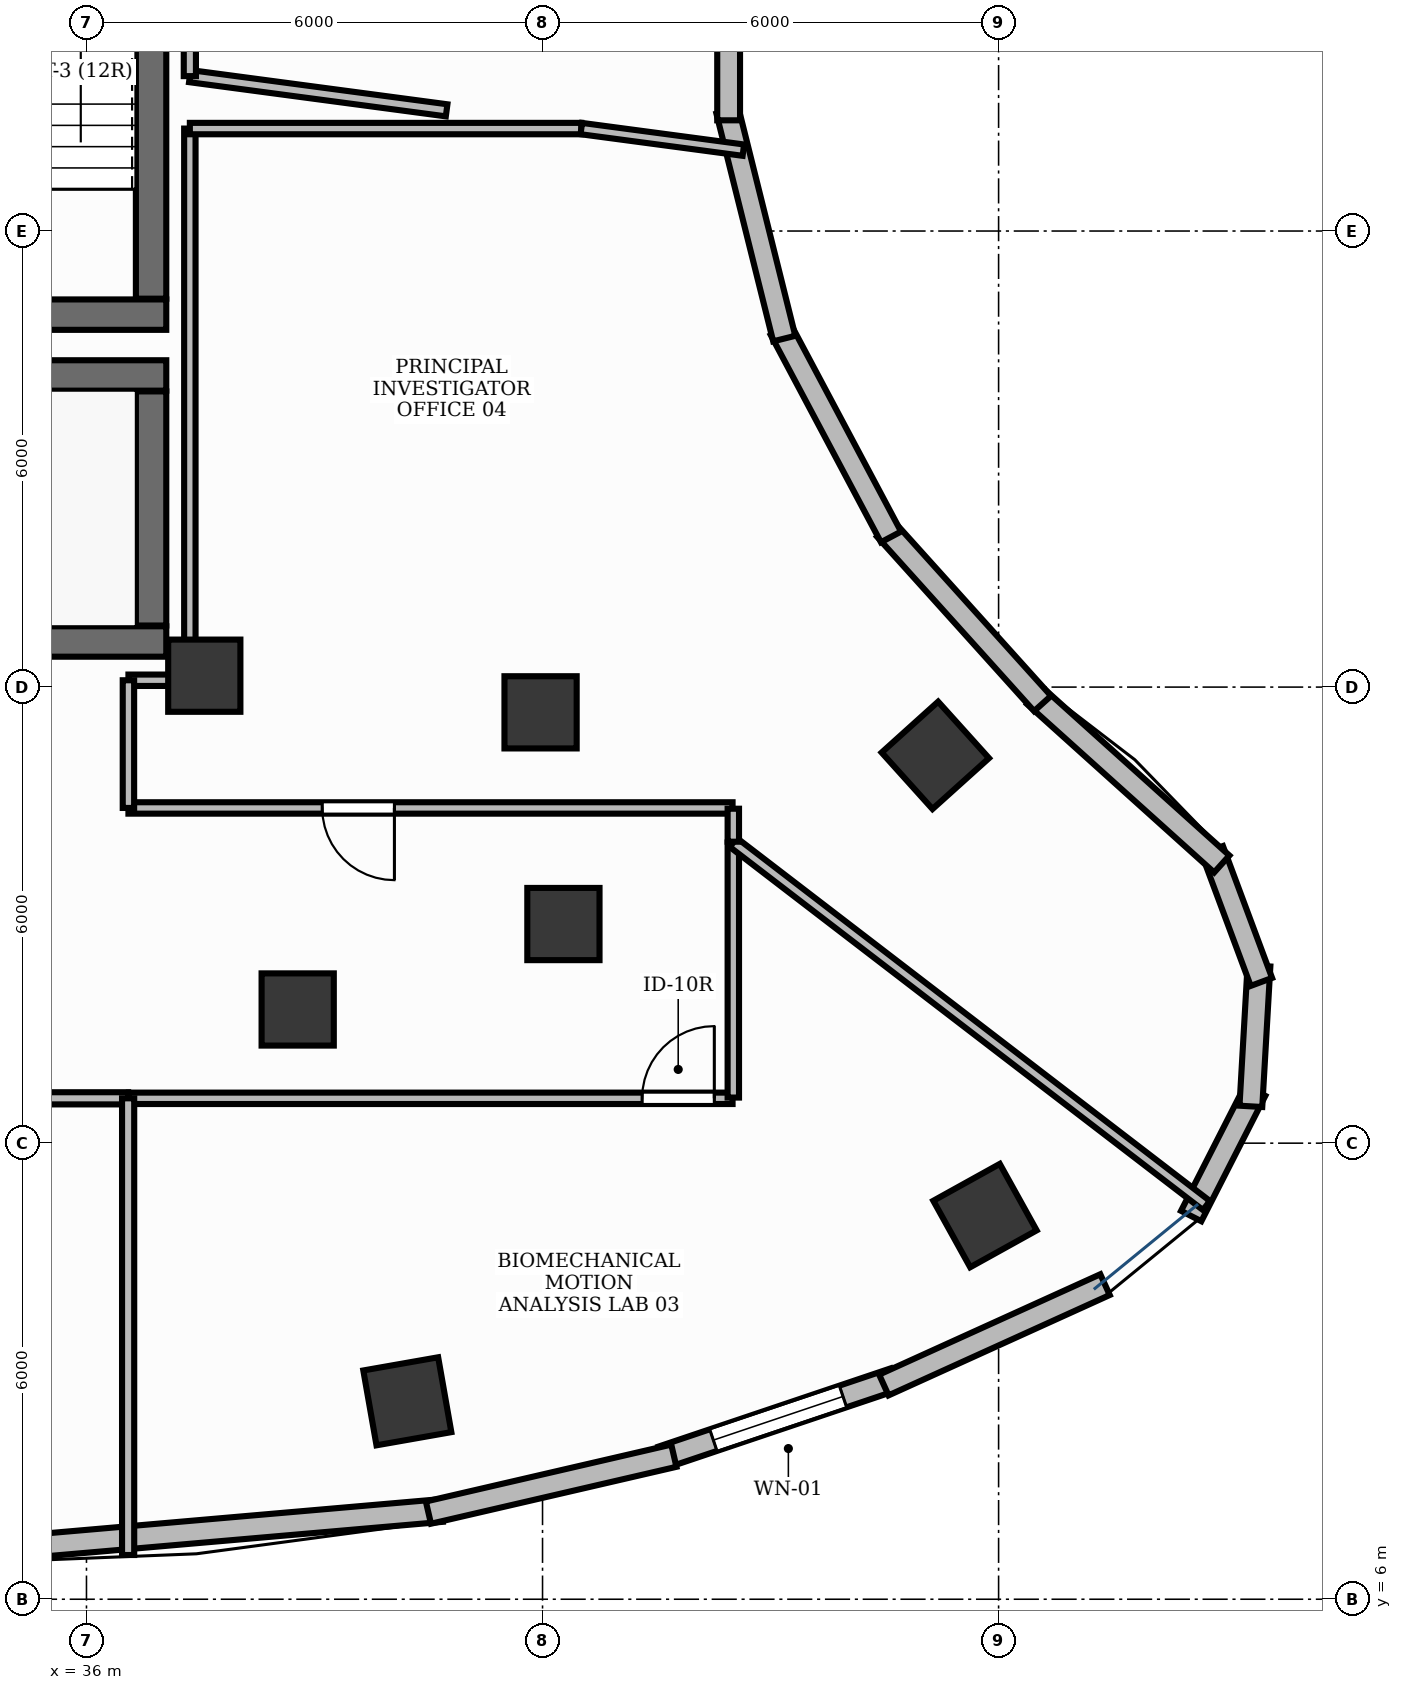
"""IFC4 building model, lengths in metres.
Left out: names, types, materials, properties, quantities, classifications, styles, units other than length and angle.
Written with IfcOpenShell. Run it as: python <this file> out.ifc"""

import sys

from ifc_helpers import new_model, si_unit, direction, frame, frame_2d, origin, origin_2d, place, context, subcontext, project, spatial, rectangle, extrude, element, fill, save


model = new_model("IFC4")
c1 = context("Model", 3, precision=1e-05, world=origin(), true_north=direction((0.0, 1.0)))
c2 = subcontext(c1, "Body", "Model", "MODEL_VIEW")
j1 = project(units=[si_unit("LENGTHUNIT", "METRE"), si_unit("PLANEANGLEUNIT", "RADIAN")], contexts=[c1])
p1 = place(None, origin())
s1 = spatial("IfcSite", under=j1, at=p1, CompositionType="ELEMENT")
p2 = place(p1, origin())
s2 = spatial("IfcBuilding", under=s1, at=p2, CompositionType="ELEMENT")
p3 = place(p2, frame((0.0, 0.0, 179.4)))
s3 = spatial("IfcBuildingStorey", under=s2, at=p3, CompositionType="ELEMENT", Elevation=179.4)
p4 = place(p3, frame((28.852, 18.6, 0.0), z_axis=(0.0, 0.0, 1.0), x_axis=(1.0, 0.0, 0.0)))
e1 = element("IfcWall", 1, at=p4, inside=s3, PredefinedType="SHEAR", context=c2, shape_type="SweptSolid", body=[
    extrude(rectangle(XDim=8.198, YDim=0.4, at=frame_2d((4.099, 0.0))), origin(), (0.0, 0.0, 1.0), 3.9),
])
p5 = place(p3, frame((28.4, 22.1, 0.0), z_axis=(0.0, 0.0, 1.0), x_axis=(1.0, 0.0, 0.0)))
e2 = element("IfcWall", 2, at=p5, inside=s3, PredefinedType="SHEAR", context=c2, shape_type="SweptSolid", body=[
    extrude(rectangle(XDim=8.65, YDim=0.4, at=frame_2d((4.325, 0.0))), origin(), (0.0, 0.0, 1.0), 3.9),
])
p6 = place(p3, frame((36.85, 18.81, 0.0), z_axis=(0.0, 0.0, 1.0), x_axis=(0.0, 1.0, 0.0)))
e3 = element("IfcWall", 3, at=p6, inside=s3, PredefinedType="SHEAR", context=c2, shape_type="SweptSolid", body=[
    extrude(rectangle(XDim=3.08, YDim=0.4, at=frame_2d((1.54, 0.0))), origin(), (0.0, 0.0, 1.0), 3.9),
])
p7 = place(p3, frame((33.15, 22.9, 0.0), z_axis=(0.0, 0.0, 1.0), x_axis=(1.0, 0.0, 0.0)))
e4 = element("IfcWall", 4, at=p7, inside=s3, PredefinedType="SHEAR", context=c2, shape_type="SweptSolid", body=[
    extrude(rectangle(XDim=3.9, YDim=0.4, at=frame_2d((1.95, 0.0))), origin(), (0.0, 0.0, 1.0), 3.9),
])
p8 = place(p3, frame((36.85, 23.11, 0.0), z_axis=(0.0, 0.0, 1.0), x_axis=(0.0, 1.0, 0.0)))
e5 = element("IfcWall", 5, at=p8, inside=s3, PredefinedType="SHEAR", context=c2, shape_type="SweptSolid", body=[
    extrude(rectangle(XDim=7.78, YDim=0.4, at=frame_2d((3.89, 0.0))), origin(), (0.0, 0.0, 1.0), 3.9),
])
p9 = place(p3, frame((37.55, 18.15, -0.0), z_axis=(0.0, 0.0, 1.0), x_axis=(1.0, 0.0, 0.0)))
e6 = element("IfcColumn", 6, at=p9, inside=s3, PredefinedType="PILASTER", context=c2, shape_type="SweptSolid", body=[
    extrude(rectangle(XDim=0.95, YDim=0.95, at=origin_2d()), origin(), (0.0, 0.0, 1.0), 3.901),
])
p10 = place(p3, frame((40.221, 8.604, -0.0), z_axis=(0.0, 0.0, 1.0), x_axis=(0.984868307662, 0.173304404339, 0.0)))
e7 = element("IfcColumn", 7, at=p10, inside=s3, PredefinedType="COLUMN", context=c2, shape_type="SweptSolid", body=[
    extrude(rectangle(XDim=1.0, YDim=1.0, at=origin_2d()), origin(), (0.0, 0.0, 1.0), 3.901),
])
p11 = place(p3, frame((38.779, 13.759, -0.0), z_axis=(0.0, 0.0, 1.0), x_axis=(1.0, 0.0, 0.0)))
e8 = element("IfcColumn", 8, at=p11, inside=s3, PredefinedType="COLUMN", context=c2, shape_type="SweptSolid", body=[
    extrude(rectangle(XDim=0.95, YDim=0.95, at=origin_2d()), origin(), (0.0, 0.0, 1.0), 3.901),
])
p12 = place(p3, frame((47.821, 11.047, -0.0), z_axis=(0.0, 0.0, 1.0), x_axis=(0.874535078577, 0.484962262797, 0.0)))
e9 = element("IfcColumn", 9, at=p12, inside=s3, PredefinedType="COLUMN", context=c2, shape_type="SweptSolid", body=[
    extrude(rectangle(XDim=1.0, YDim=1.0, at=origin_2d()), origin(), (0.0, 0.0, 1.0), 3.901),
])
p13 = place(p3, frame((42.275, 14.883, -0.0), z_axis=(0.0, 0.0, 1.0), x_axis=(1.0, 0.0, 0.0)))
e10 = element("IfcColumn", 10, at=p13, inside=s3, PredefinedType="COLUMN", context=c2, shape_type="SweptSolid", body=[
    extrude(rectangle(XDim=0.95, YDim=0.95, at=origin_2d()), origin(), (0.0, 0.0, 1.0), 3.901),
])
p14 = place(p3, frame((47.167, 17.102, -0.0), z_axis=(0.0, 0.0, 1.0), x_axis=(-0.669130606359, 0.743144825477, 0.0)))
e11 = element("IfcColumn", 11, at=p14, inside=s3, PredefinedType="COLUMN", context=c2, shape_type="SweptSolid", body=[
    extrude(rectangle(XDim=1.0, YDim=1.0, at=origin_2d()), origin(), (0.0, 0.0, 1.0), 3.901),
])
p15 = place(p3, frame((41.974, 17.668, -0.0), z_axis=(0.0, 0.0, 1.0), x_axis=(1.0, 0.0, 0.0)))
e12 = element("IfcColumn", 12, at=p15, inside=s3, PredefinedType="COLUMN", context=c2, shape_type="SweptSolid", body=[
    extrude(rectangle(XDim=0.95, YDim=0.95, at=origin_2d()), origin(), (0.0, 0.0, 1.0), 3.901),
])
p16 = place(p3, frame((43.573, 7.866, 0.0), z_axis=(0.0, 0.0, 1.0), x_axis=(0.947663163736, 0.319271871761, 0.0)))
e13 = element("IfcWall", 13, at=p16, inside=s3, PredefinedType="STANDARD", context=c2, shape_type="SweptSolid", body=[
    extrude(rectangle(XDim=3.222, YDim=0.3, at=frame_2d((1.611, 0.0))), origin(), (0.0, 0.0, 1.0), 3.9),
])
p17 = place(p16, frame((0.711, 0.0, 0.9)))
e14 = element("IfcOpeningElement", 14, at=p17, cuts=e13, PredefinedType="OPENING", context=c2, shape_type="SweptSolid", body=[
    extrude(rectangle(XDim=1.8, YDim=2.1, at=frame_2d((0.9, 1.05))), frame((0.0, 0.165, 0.0), z_axis=(0.0, -1.0, 0.0), x_axis=(1.0, 0.0, 0.0)), (0.0, 0.0, 1.0), 0.33),
])
p18 = place(p3, frame((34.149, 6.601, 0.0), z_axis=(0.0, 0.0, 1.0), x_axis=(0.996255675021, 0.086455942472, 0.0)))
e15 = element("IfcWall", 15, at=p18, inside=s3, PredefinedType="STANDARD", context=c2, shape_type="SweptSolid", body=[
    extrude(rectangle(XDim=6.551, YDim=0.3, at=frame_2d((3.276, 0.0))), origin(), (0.0, 0.0, 1.0), 3.9),
])
p19 = place(p3, frame((40.499, 7.14, 0.0), z_axis=(0.0, 0.0, 1.0), x_axis=(0.974179712493, 0.225773974956, 0.0)))
e16 = element("IfcWall", 16, at=p19, inside=s3, PredefinedType="STANDARD", context=c2, shape_type="SweptSolid", body=[
    extrude(rectangle(XDim=3.314, YDim=0.3, at=frame_2d((1.657, 0.0))), origin(), (0.0, 0.0, 1.0), 3.9),
])
p20 = place(p3, frame((46.49, 8.818, 0.0), z_axis=(0.0, 0.0, 1.0), x_axis=(0.910633193525, 0.413215666268, 0.0)))
e17 = element("IfcWall", 17, at=p20, inside=s3, PredefinedType="STANDARD", context=c2, shape_type="SweptSolid", body=[
    extrude(rectangle(XDim=3.195, YDim=0.3, at=frame_2d((1.598, 0.0))), origin(), (0.0, 0.0, 1.0), 3.9),
])
for number, where, z_axis, x_axis in (
    (18, (50.534, 11.041, 0.0), (0.0, 0.0, 1.0), (0.454, 0.891, 0.0)),
    (19, (51.319, 12.484, 0.0), (0.0, 0.0, 1.0), (0.057, 0.998, 0.0)),
    (20, (51.458, 14.121, 0.0), (0.0, 0.0, 1.0), (-0.349, 0.937, 0.0)),
):
    element("IfcWall", number, at=place(p3, frame(where, z_axis=z_axis, x_axis=x_axis)), inside=s3, PredefinedType="STANDARD", context=c2, shape_type="SweptSolid", body=[
        extrude(rectangle(XDim=1.852, YDim=0.3, at=frame_2d((0.926, 0.0))), origin(), (0.0, 0.0, 1.0), 3.9),
    ])
p21 = place(p3, frame((50.936, 15.673, 0.0), z_axis=(0.0, 0.0, 1.0), x_axis=(-0.743341827472, 0.668911748687, 0.0)))
e21 = element("IfcWall", 21, at=p21, inside=s3, PredefinedType="STANDARD", context=c2, shape_type="SweptSolid", body=[
    extrude(rectangle(XDim=3.31, YDim=0.3, at=frame_2d((1.655, 0.0))), origin(), (0.0, 0.0, 1.0), 3.9),
])
for number, where, z_axis, x_axis in (
    (22, (48.579, 17.784, 0.0), (0.0, 0.0, 1.0), (-0.669, 0.743, 0.0)),
    (23, (46.584, 19.976, 0.0), (0.0, 0.0, 1.0), (-0.469, 0.883, 0.0)),
    (24, (45.18, 22.585, 0.0), (0.0, 0.0, 1.0), (-0.242, 0.97, 0.0)),
    (25, (44.448, 25.457, 0.0), (0.0, 0.0, 1.0), (0.0, 1.0, 0.0)),
):
    element("IfcWall", number, at=place(p3, frame(where, z_axis=z_axis, x_axis=x_axis)), inside=s3, PredefinedType="STANDARD", context=c2, shape_type="SweptSolid", body=[
        extrude(rectangle(XDim=3.087, YDim=0.3, at=frame_2d((1.543, 0.0))), origin(), (0.0, 0.0, 1.0), 3.9),
    ])
p22 = place(p3, frame((19.85, 12.59, 0.0), z_axis=(0.0, 0.0, 1.0), x_axis=(1.0, 0.0, 0.0)))
e26 = element("IfcWall", 26, at=p22, inside=s3, PredefinedType="PARTITIONING", context=c2, shape_type="SweptSolid", body=[
    extrude(rectangle(XDim=16.698, YDim=0.16, at=frame_2d((8.349, 0.0))), origin(), (0.0, 0.0, 1.0), 2.91),
])
p23 = place(p22, frame((4.999, 0.0, 0.0)))
e27 = element("IfcOpeningElement", 27, at=p23, cuts=e26, PredefinedType="OPENING", context=c2, shape_type="SweptSolid", body=[
    extrude(rectangle(XDim=0.95, YDim=2.15, at=frame_2d((0.475, 1.075))), frame((0.0, 0.095, 0.0), z_axis=(0.0, -1.0, 0.0), x_axis=(1.0, 0.0, 0.0)), (0.0, 0.0, 1.0), 0.19),
])
p24 = place(p3, frame((36.558, 12.59, 0.0), z_axis=(0.0, 0.0, 1.0), x_axis=(1.0, 0.0, 0.0)))
e28 = element("IfcWall", 28, at=p24, inside=s3, PredefinedType="PARTITIONING", context=c2, shape_type="SweptSolid", body=[
    extrude(rectangle(XDim=7.942, YDim=0.15, at=frame_2d((3.971, 0.0))), origin(), (0.0, 0.0, 1.0), 2.91),
])
p25 = place(p24, frame((6.752, 0.0, 0.0)))
e29 = element("IfcOpeningElement", 29, at=p25, cuts=e28, PredefinedType="OPENING", context=c2, shape_type="SweptSolid", body=[
    extrude(rectangle(XDim=0.95, YDim=2.15, at=frame_2d((0.475, 1.075))), frame((0.0, 0.09, 0.0), z_axis=(0.0, -1.0, 0.0), x_axis=(1.0, 0.0, 0.0)), (0.0, 0.0, 1.0), 0.18),
])
p26 = place(p3, frame((44.5, 16.41, 0.0), z_axis=(0.0, 0.0, 1.0), x_axis=(-1.0, 0.0, 0.0)))
e30 = element("IfcWall", 30, at=p26, inside=s3, PredefinedType="PARTITIONING", context=c2, shape_type="SweptSolid", body=[
    extrude(rectangle(XDim=7.948, YDim=0.15, at=frame_2d((3.974, 0.0))), origin(), (0.0, 0.0, 1.0), 2.91),
])
p27 = place(p26, frame((4.449, 0.0, 0.0)))
e31 = element("IfcOpeningElement", 31, at=p27, cuts=e30, PredefinedType="OPENING", context=c2, shape_type="SweptSolid", body=[
    extrude(rectangle(XDim=0.95, YDim=2.15, at=frame_2d((0.475, 1.075))), frame((0.0, 0.09, 0.0), z_axis=(0.0, -1.0, 0.0), x_axis=(1.0, 0.0, 0.0)), (0.0, 0.0, 1.0), 0.18),
])
p28 = place(p3, frame((36.548, 12.59, 0.0), z_axis=(0.0, 0.0, 1.0), x_axis=(0.0, -1.0, 0.0)))
e32 = element("IfcWall", 32, at=p28, inside=s3, PredefinedType="PARTITIONING", context=c2, shape_type="SweptSolid", body=[
    extrude(rectangle(XDim=6.008, YDim=0.16, at=frame_2d((3.004, 0.0))), origin(), (0.0, 0.0, 1.0), 2.91),
])
p29 = place(p3, frame((44.51, 12.6, 0.0), z_axis=(0.0, 0.0, 1.0), x_axis=(0.0, 1.0, 0.0)))
e33 = element("IfcWall", 33, at=p29, inside=s3, PredefinedType="PARTITIONING", context=c2, shape_type="SweptSolid", body=[
    extrude(rectangle(XDim=3.356, YDim=0.15, at=frame_2d((1.678, 0.0))), origin(), (0.0, 0.0, 1.0), 2.91),
])
p30 = place(p3, frame((44.51, 15.956, 0.0), z_axis=(0.0, 0.0, 1.0), x_axis=(0.793353363714, -0.608761398484, 0.0)))
e34 = element("IfcWall", 34, at=p30, inside=s3, PredefinedType="PARTITIONING", context=c2, shape_type="SweptSolid", body=[
    extrude(rectangle(XDim=7.846, YDim=0.15, at=frame_2d((3.923, 0.0))), origin(), (0.0, 0.0, 1.0), 2.91),
])
p31 = place(p3, frame((36.552, 18.09, 0.0), z_axis=(0.0, 0.0, 1.0), x_axis=(1.0, 0.0, 0.0)))
e35 = element("IfcWall", 35, at=p31, inside=s3, PredefinedType="PARTITIONING", context=c2, shape_type="SweptSolid", body=[
    extrude(rectangle(XDim=0.798, YDim=0.15, at=frame_2d((0.399, 0.0))), origin(), (0.0, 0.0, 1.0), 2.91),
])
p32 = place(p3, frame((37.36, 18.1, 0.0), z_axis=(0.0, 0.0, 1.0), x_axis=(0.0, 1.0, 0.0)))
e36 = element("IfcWall", 36, at=p32, inside=s3, PredefinedType="PARTITIONING", context=c2, shape_type="SweptSolid", body=[
    extrude(rectangle(XDim=7.248, YDim=0.15, at=frame_2d((3.624, 0.0))), origin(), (0.0, 0.0, 1.0), 2.91),
])
p33 = place(p3, frame((37.36, 25.348, 0.0), z_axis=(0.0, 0.0, 1.0), x_axis=(1.0, 0.0, 0.0)))
e37 = element("IfcWall", 37, at=p33, inside=s3, PredefinedType="PARTITIONING", context=c2, shape_type="SweptSolid", body=[
    extrude(rectangle(XDim=5.15, YDim=0.15, at=frame_2d((2.575, 0.0))), origin(), (0.0, 0.0, 1.0), 2.91),
])
p34 = place(p3, frame((42.51, 25.348, 0.0), z_axis=(0.0, 0.0, 1.0), x_axis=(0.991248706097, -0.132007585617, 0.0)))
e38 = element("IfcWall", 38, at=p34, inside=s3, PredefinedType="PARTITIONING", context=c2, shape_type="SweptSolid", body=[
    extrude(rectangle(XDim=2.151, YDim=0.15, at=frame_2d((1.075, 0.0))), origin(), (0.0, 0.0, 1.0), 2.91),
])
p35 = place(p3, frame((44.51, 15.966, 0.0), z_axis=(0.0, 0.0, 1.0), x_axis=(0.0, 1.0, 0.0)))
e39 = element("IfcWall", 39, at=p35, inside=s3, PredefinedType="PARTITIONING", context=c2, shape_type="SweptSolid", body=[
    extrude(rectangle(XDim=0.434, YDim=0.15, at=frame_2d((0.217, 0.0))), origin(), (0.0, 0.0, 1.0), 2.91),
])
p36 = place(p3, frame((36.552, 16.41, 0.0), z_axis=(0.0, 0.0, 1.0), x_axis=(0.0, 1.0, 0.0)))
e40 = element("IfcWall", 40, at=p36, inside=s3, PredefinedType="PARTITIONING", context=c2, shape_type="SweptSolid", body=[
    extrude(rectangle(XDim=1.68, YDim=0.15, at=frame_2d((0.84, 0.0))), origin(), (0.0, 0.0, 1.0), 2.91),
])
p37 = place(p3, frame((40.738, 25.588, 0.0), z_axis=(0.0, 0.0, 1.0), x_axis=(-0.9912460353, 0.13202763916, 0.0)))
e41 = element("IfcWall", 41, at=p37, inside=s3, PredefinedType="PARTITIONING", context=c2, shape_type="SweptSolid", body=[
    extrude(rectangle(XDim=3.408, YDim=0.16, at=frame_2d((1.704, 0.0))), origin(), (0.0, 0.0, 1.0), 2.91),
])
p38 = place(p3, frame((37.36, 26.038, 0.0), z_axis=(0.0, 0.0, 1.0), x_axis=(0.0, 1.0, 0.0)))
e42 = element("IfcWall", 42, at=p38, inside=s3, PredefinedType="PARTITIONING", context=c2, shape_type="SweptSolid", body=[
    extrude(rectangle(XDim=7.912, YDim=0.16, at=frame_2d((3.956, 0.0))), origin(), (0.0, 0.0, 1.0), 2.91),
])
p39 = place(p17, origin())
e43 = element("IfcWindow", 43, at=p39, inside=s3, PartitioningType="SINGLE_PANEL", PredefinedType="WINDOW", context=c2, shape_type="SweptSolid", body=[
    extrude(rectangle(XDim=1.8, YDim=2.1, at=frame_2d((0.9, 1.05))), frame((0.0, 0.03, 0.0), z_axis=(0.0, -1.0, 0.0), x_axis=(1.0, 0.0, 0.0)), (0.0, 0.0, 1.0), 0.06),
])
fill(e14, e43)
p40 = place(p25, origin())
e44 = element("IfcDoor", 44, at=p40, inside=s3, OperationType="SINGLE_SWING_RIGHT", PredefinedType="DOOR", context=c2, shape_type="SweptSolid", body=[
    extrude(rectangle(XDim=0.95, YDim=2.15, at=frame_2d((0.475, 1.075))), frame((0.0, 0.025, 0.0), z_axis=(0.0, -1.0, 0.0), x_axis=(1.0, 0.0, 0.0)), (0.0, 0.0, 1.0), 0.05),
])
fill(e29, e44)
p41 = place(p27, origin())
e45 = element("IfcDoor", 45, at=p41, inside=s3, OperationType="SINGLE_SWING_LEFT", PredefinedType="DOOR", context=c2, shape_type="SweptSolid", body=[
    extrude(rectangle(XDim=0.95, YDim=2.15, at=frame_2d((0.475, 1.075))), frame((0.0, 0.025, 0.0), z_axis=(0.0, -1.0, 0.0), x_axis=(1.0, 0.0, 0.0)), (0.0, 0.0, 1.0), 0.05),
])
fill(e31, e45)
save(model, sys.argv[1])
